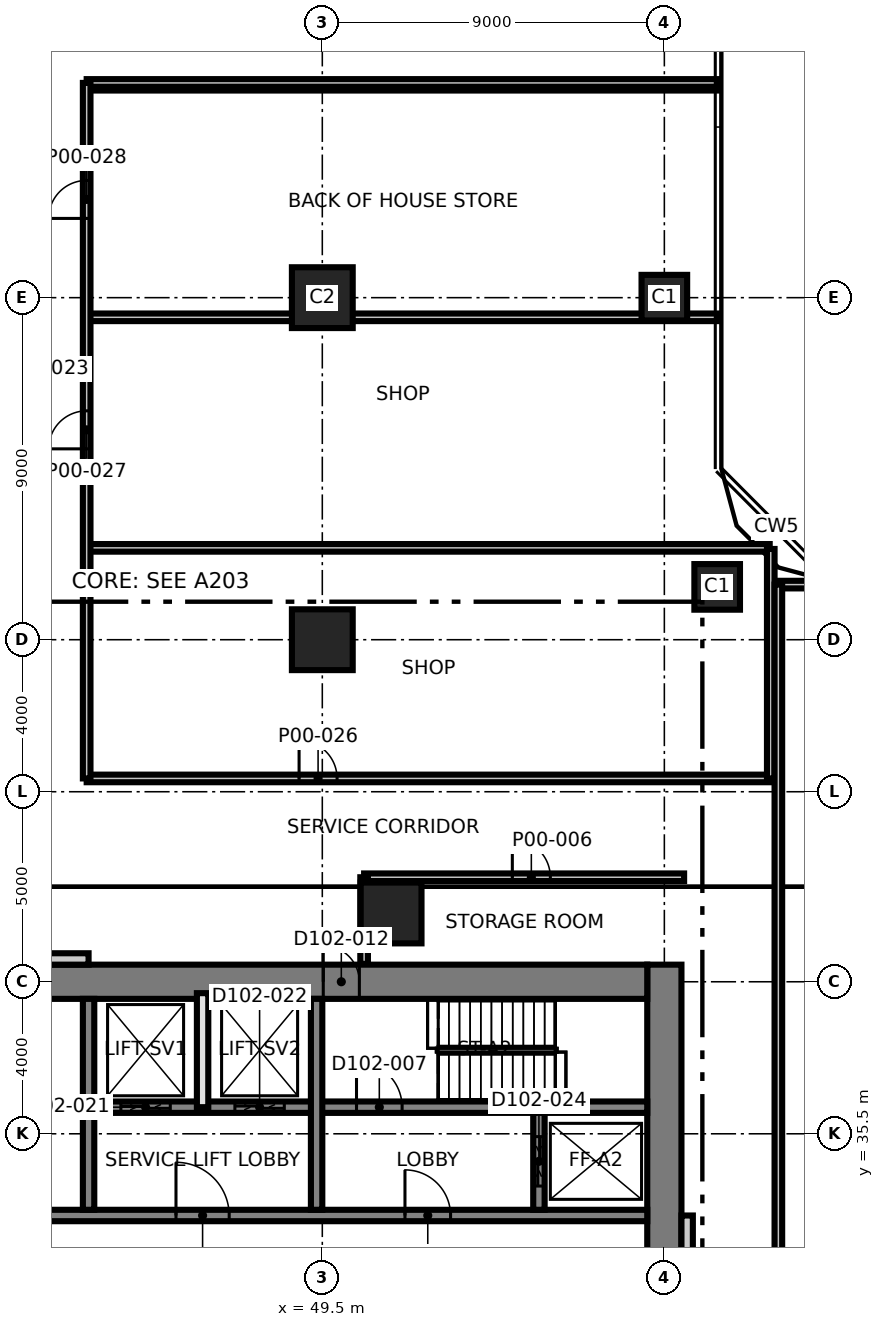
"""IFC4 building model, lengths in metres.
Left out: names, types, materials, properties, quantities, classifications, styles, units other than length and angle.
Written with IfcOpenShell. Run it as: python <this file> out.ifc"""

import sys

from ifc_helpers import new_model, si_unit, direction, frame, frame_2d, origin, origin_2d, place, context, subcontext, project, spatial, rectangle, extrude, element, fill, save


model = new_model("IFC4")
c1 = context("Model", 3, precision=1e-05, world=origin(), true_north=direction((0.0, 1.0)))
c2 = subcontext(c1, "Body", "Model", "MODEL_VIEW")
j1 = project(units=[si_unit("LENGTHUNIT", "METRE"), si_unit("PLANEANGLEUNIT", "RADIAN")], contexts=[c1])
p1 = place(None, origin())
s1 = spatial("IfcSite", under=j1, at=p1, CompositionType="ELEMENT")
p2 = place(p1, origin())
s2 = spatial("IfcBuilding", under=s1, at=p2, CompositionType="ELEMENT")
p3 = place(p2, origin())
s3 = spatial("IfcBuildingStorey", under=s2, at=p3, CompositionType="ELEMENT", Elevation=0.0)
p4 = place(p3, frame((58.5, 21.05, 0.0), z_axis=(0.0, 0.0, 1.0), x_axis=(0.0, 1.0, 0.0)))
e1 = element("IfcWall", 1, at=p4, inside=s3, PredefinedType="SHEAR", context=c2, shape_type="SweptSolid", body=[
    extrude(rectangle(XDim=18.9, YDim=0.9, at=frame_2d((9.45, 0.0))), origin(), (0.0, 0.0, 1.0), 8.0),
])
p5 = place(p3, frame((31.05, 39.5, 0.0), z_axis=(0.0, 0.0, 1.0), x_axis=(1.0, 0.0, 0.0)))
e2 = element("IfcWall", 2, at=p5, inside=s3, PredefinedType="SHEAR", context=c2, shape_type="SweptSolid", body=[
    extrude(rectangle(XDim=27.0, YDim=0.9, at=frame_2d((13.5, 0.0))), origin(), (0.0, 0.0, 1.0), 8.0),
])
p6 = place(p5, frame((7.1, 0.0, 0.0)))
e3 = element("IfcOpeningElement", 3, at=p6, cuts=e2, PredefinedType="OPENING", context=c2, shape_type="SweptSolid", body=[
    extrude(rectangle(XDim=1.3, YDim=2.1, at=frame_2d((0.65, 1.05))), frame((0.0, 0.46, 0.0), z_axis=(0.0, -1.0, 0.0), x_axis=(1.0, 0.0, 0.0)), (0.0, 0.0, 1.0), 0.92),
])
p7 = place(p5, frame((18.475, 0.0, 0.0)))
e4 = element("IfcOpeningElement", 4, at=p7, cuts=e2, PredefinedType="OPENING", context=c2, shape_type="SweptSolid", body=[
    extrude(rectangle(XDim=0.95, YDim=2.1, at=frame_2d((0.475, 1.05))), frame((0.0, 0.46, 0.0), z_axis=(0.0, -1.0, 0.0), x_axis=(1.0, 0.0, 0.0)), (0.0, 0.0, 1.0), 0.92),
])
p8 = place(p3, frame((31.95, 33.35, 0.0), z_axis=(0.0, 0.0, 1.0), x_axis=(1.0, 0.0, 0.0)))
e5 = element("IfcWall", 5, at=p8, inside=s3, PredefinedType="SHEAR", context=c2, shape_type="SweptSolid", body=[
    extrude(rectangle(XDim=26.1, YDim=0.3, at=frame_2d((13.05, 0.0))), origin(), (0.0, 0.0, 1.0), 8.0),
])
p9 = place(p8, frame((13.7, 0.0, 0.0)))
e6 = element("IfcOpeningElement", 6, at=p9, cuts=e5, PredefinedType="OPENING", context=c2, shape_type="SweptSolid", body=[
    extrude(rectangle(XDim=1.4, YDim=2.1, at=frame_2d((0.7, 1.05))), frame((0.0, 0.16, 0.0), z_axis=(0.0, -1.0, 0.0), x_axis=(1.0, 0.0, 0.0)), (0.0, 0.0, 1.0), 0.32),
])
p10 = place(p8, frame((5.175, 0.0, 0.0)))
e7 = element("IfcOpeningElement", 7, at=p10, cuts=e5, PredefinedType="OPENING", context=c2, shape_type="SweptSolid", body=[
    extrude(rectangle(XDim=1.2, YDim=2.1, at=frame_2d((0.6, 1.05))), frame((0.0, 0.16, 0.0), z_axis=(0.0, -1.0, 0.0), x_axis=(1.0, 0.0, 0.0)), (0.0, 0.0, 1.0), 0.32),
])
p11 = place(p8, frame((19.725, 0.0, 0.0)))
e8 = element("IfcOpeningElement", 8, at=p11, cuts=e5, PredefinedType="OPENING", context=c2, shape_type="SweptSolid", body=[
    extrude(rectangle(XDim=1.2, YDim=2.1, at=frame_2d((0.6, 1.05))), frame((0.0, 0.16, 0.0), z_axis=(0.0, -1.0, 0.0), x_axis=(1.0, 0.0, 0.0)), (0.0, 0.0, 1.0), 0.32),
])
p12 = place(p3, frame((43.5, 36.2, 0.0), z_axis=(0.0, 0.0, 1.0), x_axis=(1.0, 0.0, 0.0)))
e9 = element("IfcWall", 9, at=p12, inside=s3, PredefinedType="SHEAR", context=c2, shape_type="SweptSolid", body=[
    extrude(rectangle(XDim=14.55, YDim=0.3, at=frame_2d((7.275, 0.0))), origin(), (0.0, 0.0, 1.0), 8.0),
])
p13 = place(p12, frame((6.9, 0.0, 0.0)))
e10 = element("IfcOpeningElement", 10, at=p13, cuts=e9, PredefinedType="OPENING", context=c2, shape_type="SweptSolid", body=[
    extrude(rectangle(XDim=1.2, YDim=2.1, at=frame_2d((0.6, 1.05))), frame((0.0, 0.16, 0.0), z_axis=(0.0, -1.0, 0.0), x_axis=(1.0, 0.0, 0.0)), (0.0, 0.0, 1.0), 0.32),
])
p14 = place(p12, frame((0.7, 0.0, 0.0)))
e11 = element("IfcOpeningElement", 11, at=p14, cuts=e9, PredefinedType="OPENING", context=c2, shape_type="SweptSolid", body=[
    extrude(rectangle(XDim=1.3, YDim=2.4, at=frame_2d((0.65, 1.2))), frame((0.0, 0.16, 0.0), z_axis=(0.0, -1.0, 0.0), x_axis=(1.0, 0.0, 0.0)), (0.0, 0.0, 1.0), 0.32),
])
p15 = place(p12, frame((3.7, 0.0, 0.0)))
e12 = element("IfcOpeningElement", 12, at=p15, cuts=e9, PredefinedType="OPENING", context=c2, shape_type="SweptSolid", body=[
    extrude(rectangle(XDim=1.3, YDim=2.4, at=frame_2d((0.65, 1.2))), frame((0.0, 0.16, 0.0), z_axis=(0.0, -1.0, 0.0), x_axis=(1.0, 0.0, 0.0)), (0.0, 0.0, 1.0), 0.32),
])
for number, where, z_axis, x_axis in (
    (13, (43.35, 33.5, 0.0), (0.0, 0.0, 1.0), (0.0, 1.0, 0.0)),
    (14, (49.35, 33.5, 0.0), (0.0, 0.0, 1.0), (0.0, 1.0, 0.0)),
):
    element("IfcWall", number, at=place(p3, frame(where, z_axis=z_axis, x_axis=x_axis)), inside=s3, PredefinedType="SHEAR", context=c2, shape_type="SweptSolid", body=[
        extrude(rectangle(XDim=5.55, YDim=0.3, at=frame_2d((2.775, 0.0))), origin(), (0.0, 0.0, 1.0), 8.0),
    ])
p16 = place(p3, frame((55.2, 33.5, 0.0), z_axis=(0.0, 0.0, 1.0), x_axis=(0.0, 1.0, 0.0)))
e15 = element("IfcWall", 15, at=p16, inside=s3, PredefinedType="SHEAR", context=c2, shape_type="SweptSolid", body=[
    extrude(rectangle(XDim=2.55, YDim=0.3, at=frame_2d((1.275, 0.0))), origin(), (0.0, 0.0, 1.0), 8.0),
])
p17 = place(p16, frame((0.625, 0.0, 0.0)))
e16 = element("IfcOpeningElement", 16, at=p17, cuts=e15, PredefinedType="OPENING", context=c2, shape_type="SweptSolid", body=[
    extrude(rectangle(XDim=1.3, YDim=2.4, at=frame_2d((0.65, 1.2))), frame((0.0, 0.16, 0.0), z_axis=(0.0, -1.0, 0.0), x_axis=(1.0, 0.0, 0.0)), (0.0, 0.0, 1.0), 0.32),
])
p18 = place(p3, frame((49.5, 48.5, 0.0), z_axis=(0.0, 0.0, 1.0), x_axis=(1.0, 0.0, 0.0)))
e17 = element("IfcColumn", 17, at=p18, inside=s3, PredefinedType="COLUMN", context=c2, shape_type="SweptSolid", body=[
    extrude(rectangle(XDim=1.6, YDim=1.6, at=origin_2d()), origin(), (0.0, 0.0, 1.0), 8.0),
])
p19 = place(p3, frame((59.89, 49.89, 0.0), z_axis=(0.0, 0.0, 1.0), x_axis=(1.0, 0.0, 0.0)))
e18 = element("IfcColumn", 18, at=p19, inside=s3, PredefinedType="COLUMN", context=c2, shape_type="SweptSolid", body=[
    extrude(rectangle(XDim=1.2, YDim=1.2, at=origin_2d()), origin(), (0.0, 0.0, 1.0), 8.0),
])
p20 = place(p3, frame((49.5, 57.5, 0.0), z_axis=(0.0, 0.0, 1.0), x_axis=(1.0, 0.0, 0.0)))
e19 = element("IfcColumn", 19, at=p20, inside=s3, PredefinedType="COLUMN", context=c2, shape_type="SweptSolid", body=[
    extrude(rectangle(XDim=1.6, YDim=1.6, at=origin_2d()), origin(), (0.0, 0.0, 1.0), 8.0),
])
p21 = place(p3, frame((58.5, 57.5, 0.0), z_axis=(0.0, 0.0, 1.0), x_axis=(1.0, 0.0, 0.0)))
e20 = element("IfcColumn", 20, at=p21, inside=s3, PredefinedType="COLUMN", context=c2, shape_type="SweptSolid", body=[
    extrude(rectangle(XDim=1.2, YDim=1.2, at=origin_2d()), origin(), (0.0, 0.0, 1.0), 8.0),
])
p22 = place(p3, frame((51.31, 41.31, 0.0), z_axis=(0.0, 0.0, 1.0), x_axis=(1.0, 0.0, 0.0)))
e21 = element("IfcColumn", 21, at=p22, inside=s3, PredefinedType="COLUMN", context=c2, shape_type="SweptSolid", body=[
    extrude(rectangle(XDim=1.6, YDim=1.6, at=origin_2d()), origin(), (0.0, 0.0, 1.0), 8.0),
])
p23 = place(p3, frame((40.65, 40.1, 0.0), z_axis=(0.0, 0.0, 1.0), x_axis=(1.0, 0.0, 0.0)))
e22 = element("IfcWall", 22, at=p23, inside=s3, PredefinedType="PARTITIONING", context=c2, shape_type="SweptSolid", body=[
    extrude(rectangle(XDim=2.7, YDim=0.3, at=frame_2d((1.35, 0.0))), origin(), (0.0, 0.0, 1.0), 7.7),
])
p24 = place(p3, frame((46.35, 36.2, 0.0), z_axis=(0.0, 0.0, 1.0), x_axis=(0.0, 1.0, 0.0)))
e23 = element("IfcWall", 23, at=p24, inside=s3, PredefinedType="SOLIDWALL", context=c2, shape_type="SweptSolid", body=[
    extrude(rectangle(XDim=3.0, YDim=0.3, at=frame_2d((1.5, 0.0))), origin(), (0.0, 0.0, 1.0), 7.7),
])
p25 = place(p3, frame((59.1, 30.65, 0.0), z_axis=(0.0, 0.0, 1.0), x_axis=(0.0, 1.0, 0.0)))
e24 = element("IfcWall", 24, at=p25, inside=s3, PredefinedType="PARTITIONING", context=c2, shape_type="SweptSolid", body=[
    extrude(rectangle(XDim=2.7, YDim=0.3, at=frame_2d((1.35, 0.0))), origin(), (0.0, 0.0, 1.0), 7.7),
])
p26 = place(p3, frame((50.6, 42.25, 0.0), z_axis=(0.0, 0.0, 1.0), x_axis=(1.0, 0.0, 0.0)))
e25 = element("IfcWall", 25, at=p26, inside=s3, PredefinedType="PARTITIONING", context=c2, shape_type="SweptSolid", body=[
    extrude(rectangle(XDim=8.42, YDim=0.2, at=frame_2d((4.21, 0.0))), origin(), (0.0, 0.0, 1.0), 7.7),
])
p27 = place(p26, frame((3.9, 0.0, 0.0)))
e26 = element("IfcOpeningElement", 26, at=p27, cuts=e25, PredefinedType="OPENING", context=c2, shape_type="SweptSolid", body=[
    extrude(rectangle(XDim=1.0, YDim=2.1, at=frame_2d((0.5, 1.05))), frame((0.0, 0.11, 0.0), z_axis=(0.0, -1.0, 0.0), x_axis=(1.0, 0.0, 0.0)), (0.0, 0.0, 1.0), 0.22),
])
p28 = place(p3, frame((43.3, 44.85, 0.0), z_axis=(0.0, 0.0, 1.0), x_axis=(1.0, 0.0, 0.0)))
e27 = element("IfcWall", 27, at=p28, inside=s3, PredefinedType="PARTITIONING", context=c2, shape_type="SweptSolid", body=[
    extrude(rectangle(XDim=18.2, YDim=0.2, at=frame_2d((9.1, 0.0))), origin(), (0.0, 0.0, 1.0), 7.7),
])
p29 = place(p28, frame((5.589, 0.0, 0.0)))
e28 = element("IfcOpeningElement", 28, at=p29, cuts=e27, PredefinedType="OPENING", context=c2, shape_type="SweptSolid", body=[
    extrude(rectangle(XDim=1.0, YDim=2.1, at=frame_2d((0.5, 1.05))), frame((0.0, 0.11, 0.0), z_axis=(0.0, -1.0, 0.0), x_axis=(1.0, 0.0, 0.0)), (0.0, 0.0, 1.0), 0.22),
])
p30 = place(p3, frame((61.5, 49.95, 0.0), z_axis=(0.0, 0.0, 1.0), x_axis=(1.0, 0.0, 0.0)))
e29 = element("IfcWall", 29, at=p30, inside=s3, PredefinedType="PARTITIONING", context=c2, shape_type="SweptSolid", body=[
    extrude(rectangle(XDim=1.416, YDim=0.2, at=frame_2d((0.708, 0.0))), origin(), (0.0, 0.0, 1.0), 6.8),
])
p31 = place(p3, frame((43.3, 50.917, 0.0), z_axis=(0.0, 0.0, 1.0), x_axis=(1.0, 0.0, 0.0)))
e30 = element("IfcWall", 30, at=p31, inside=s3, PredefinedType="PARTITIONING", context=c2, shape_type="SweptSolid", body=[
    extrude(rectangle(XDim=17.972, YDim=0.2, at=frame_2d((8.986, 0.0))), origin(), (0.0, 0.0, 1.0), 6.8),
])
for number, where, z_axis, x_axis in (
    (31, (43.3, 56.983, 0.0), (0.0, 0.0, 1.0), (1.0, 0.0, 0.0)),
    (32, (43.3, 63.05, 0.0), (0.0, 0.0, 1.0), (1.0, 0.0, 0.0)),
    (33, (43.3, 63.15, 0.0), (0.0, 0.0, 1.0), (1.0, 0.0, 0.0)),
):
    element("IfcWall", number, at=place(p3, frame(where, z_axis=z_axis, x_axis=x_axis)), inside=s3, PredefinedType="PARTITIONING", context=c2, shape_type="SweptSolid", body=[
        extrude(rectangle(XDim=16.63, YDim=0.2, at=frame_2d((8.315, 0.0))), origin(), (0.0, 0.0, 1.0), 6.8),
    ])
p32 = place(p3, frame((43.3, 44.85, 0.0), z_axis=(0.0, 0.0, 1.0), x_axis=(0.0, 1.0, 0.0)))
e34 = element("IfcWall", 34, at=p32, inside=s3, PredefinedType="PARTITIONING", context=c2, shape_type="SweptSolid", body=[
    extrude(rectangle(XDim=18.3, YDim=0.2, at=frame_2d((9.15, 0.0))), origin(), (0.0, 0.0, 1.0), 7.7),
])
p33 = place(p32, frame((8.672, 0.0, 0.0)))
e35 = element("IfcOpeningElement", 35, at=p33, cuts=e34, PredefinedType="OPENING", context=c2, shape_type="SweptSolid", body=[
    extrude(rectangle(XDim=1.0, YDim=2.1, at=frame_2d((0.5, 1.05))), frame((0.0, 0.11, 0.0), z_axis=(0.0, -1.0, 0.0), x_axis=(1.0, 0.0, 0.0)), (0.0, 0.0, 1.0), 0.22),
])
p34 = place(p32, frame((14.735, 0.0, 0.0)))
e36 = element("IfcOpeningElement", 36, at=p34, cuts=e34, PredefinedType="OPENING", context=c2, shape_type="SweptSolid", body=[
    extrude(rectangle(XDim=1.0, YDim=2.1, at=frame_2d((0.5, 1.05))), frame((0.0, 0.11, 0.0), z_axis=(0.0, -1.0, 0.0), x_axis=(1.0, 0.0, 0.0)), (0.0, 0.0, 1.0), 0.22),
])
p35 = place(p3, frame((50.6, 39.97, 0.0), z_axis=(0.0, 0.0, 1.0), x_axis=(0.0, 1.0, 0.0)))
e37 = element("IfcWall", 37, at=p35, inside=s3, PredefinedType="PARTITIONING", context=c2, shape_type="SweptSolid", body=[
    extrude(rectangle(XDim=2.28, YDim=0.2, at=frame_2d((1.14, 0.0))), origin(), (0.0, 0.0, 1.0), 7.7),
])
p36 = place(p3, frame((61.3, 44.85, 0.0), z_axis=(0.0, 0.0, 1.0), x_axis=(0.0, 1.0, 0.0)))
e38 = element("IfcWall", 38, at=p36, inside=s3, PredefinedType="PARTITIONING", context=c2, shape_type="SweptSolid", body=[
    extrude(rectangle(XDim=6.038, YDim=0.2, at=frame_2d((3.019, 0.0))), origin(), (0.0, 0.0, 1.0), 6.8),
])
p37 = place(p3, frame((61.5, 30.95, 0.0), z_axis=(0.0, 0.0, 1.0), x_axis=(0.0, 1.0, 0.0)))
e39 = element("IfcWall", 39, at=p37, inside=s3, PredefinedType="PARTITIONING", context=c2, shape_type="SweptSolid", body=[
    extrude(rectangle(XDim=19.0, YDim=0.2, at=frame_2d((9.5, 0.0))), origin(), (0.0, 0.0, 1.0), 6.8),
])
p38 = place(p9, origin())
e40 = element("IfcDoor", 40, at=p38, inside=s3, OperationType="SINGLE_SWING_RIGHT", PredefinedType="DOOR", context=c2, shape_type="SweptSolid", body=[
    extrude(rectangle(XDim=1.4, YDim=2.1, at=frame_2d((0.7, 1.05))), frame((0.0, 0.025, 0.0), z_axis=(0.0, -1.0, 0.0), x_axis=(1.0, 0.0, 0.0)), (0.0, 0.0, 1.0), 0.05),
])
fill(e6, e40)
p39 = place(p11, origin())
e41 = element("IfcDoor", 41, at=p39, inside=s3, OperationType="SINGLE_SWING_RIGHT", PredefinedType="DOOR", context=c2, shape_type="SweptSolid", body=[
    extrude(rectangle(XDim=1.2, YDim=2.1, at=frame_2d((0.6, 1.05))), frame((0.0, 0.025, 0.0), z_axis=(0.0, -1.0, 0.0), x_axis=(1.0, 0.0, 0.0)), (0.0, 0.0, 1.0), 0.05),
])
fill(e8, e41)
p40 = place(p13, origin())
e42 = element("IfcDoor", 42, at=p40, inside=s3, OperationType="SINGLE_SWING_LEFT", PredefinedType="DOOR", context=c2, shape_type="SweptSolid", body=[
    extrude(rectangle(XDim=1.2, YDim=2.1, at=frame_2d((0.6, 1.05))), frame((0.0, 0.025, 0.0), z_axis=(0.0, -1.0, 0.0), x_axis=(1.0, 0.0, 0.0)), (0.0, 0.0, 1.0), 0.05),
])
fill(e10, e42)
p41 = place(p7, origin())
e43 = element("IfcDoor", 43, at=p41, inside=s3, OperationType="SINGLE_SWING_LEFT", PredefinedType="DOOR", context=c2, shape_type="SweptSolid", body=[
    extrude(rectangle(XDim=0.95, YDim=2.1, at=frame_2d((0.475, 1.05))), frame((0.0, 0.025, 0.0), z_axis=(0.0, -1.0, 0.0), x_axis=(1.0, 0.0, 0.0)), (0.0, 0.0, 1.0), 0.05),
])
fill(e4, e43)
p42 = place(p14, origin())
e44 = element("IfcDoor", 44, at=p42, inside=s3, OperationType="SLIDING_TO_LEFT", PredefinedType="DOOR", context=c2, shape_type="SweptSolid", body=[
    extrude(rectangle(XDim=1.3, YDim=2.4, at=frame_2d((0.65, 1.2))), frame((0.0, 0.025, 0.0), z_axis=(0.0, -1.0, 0.0), x_axis=(1.0, 0.0, 0.0)), (0.0, 0.0, 1.0), 0.05),
])
fill(e11, e44)
p43 = place(p15, origin())
e45 = element("IfcDoor", 45, at=p43, inside=s3, OperationType="SLIDING_TO_LEFT", PredefinedType="DOOR", context=c2, shape_type="SweptSolid", body=[
    extrude(rectangle(XDim=1.3, YDim=2.4, at=frame_2d((0.65, 1.2))), frame((0.0, 0.025, 0.0), z_axis=(0.0, -1.0, 0.0), x_axis=(1.0, 0.0, 0.0)), (0.0, 0.0, 1.0), 0.05),
])
fill(e12, e45)
p44 = place(p17, origin())
e46 = element("IfcDoor", 46, at=p44, inside=s3, OperationType="SLIDING_TO_LEFT", PredefinedType="DOOR", context=c2, shape_type="SweptSolid", body=[
    extrude(rectangle(XDim=1.3, YDim=2.4, at=frame_2d((0.65, 1.2))), frame((0.0, 0.025, 0.0), z_axis=(0.0, -1.0, 0.0), x_axis=(1.0, 0.0, 0.0)), (0.0, 0.0, 1.0), 0.05),
])
fill(e16, e46)
p45 = place(p27, origin())
e47 = element("IfcDoor", 47, at=p45, inside=s3, OperationType="SINGLE_SWING_RIGHT", PredefinedType="DOOR", context=c2, shape_type="SweptSolid", body=[
    extrude(rectangle(XDim=1.0, YDim=2.1, at=frame_2d((0.5, 1.05))), frame((0.0, 0.025, 0.0), z_axis=(0.0, -1.0, 0.0), x_axis=(1.0, 0.0, 0.0)), (0.0, 0.0, 1.0), 0.05),
])
fill(e26, e47)
p46 = place(p29, origin())
e48 = element("IfcDoor", 48, at=p46, inside=s3, OperationType="SINGLE_SWING_RIGHT", PredefinedType="DOOR", context=c2, shape_type="SweptSolid", body=[
    extrude(rectangle(XDim=1.0, YDim=2.1, at=frame_2d((0.5, 1.05))), frame((0.0, 0.025, 0.0), z_axis=(0.0, -1.0, 0.0), x_axis=(1.0, 0.0, 0.0)), (0.0, 0.0, 1.0), 0.05),
])
fill(e28, e48)
p47 = place(p33, origin())
e49 = element("IfcDoor", 49, at=p47, inside=s3, OperationType="SINGLE_SWING_LEFT", PredefinedType="DOOR", context=c2, shape_type="SweptSolid", body=[
    extrude(rectangle(XDim=1.0, YDim=2.1, at=frame_2d((0.5, 1.05))), frame((0.0, 0.025, 0.0), z_axis=(0.0, -1.0, 0.0), x_axis=(1.0, 0.0, 0.0)), (0.0, 0.0, 1.0), 0.05),
])
fill(e35, e49)
p48 = place(p34, origin())
e50 = element("IfcDoor", 50, at=p48, inside=s3, OperationType="SINGLE_SWING_RIGHT", PredefinedType="DOOR", context=c2, shape_type="SweptSolid", body=[
    extrude(rectangle(XDim=1.0, YDim=2.1, at=frame_2d((0.5, 1.05))), frame((0.0, 0.025, 0.0), z_axis=(0.0, -1.0, 0.0), x_axis=(1.0, 0.0, 0.0)), (0.0, 0.0, 1.0), 0.05),
])
fill(e36, e50)
save(model, sys.argv[1])
